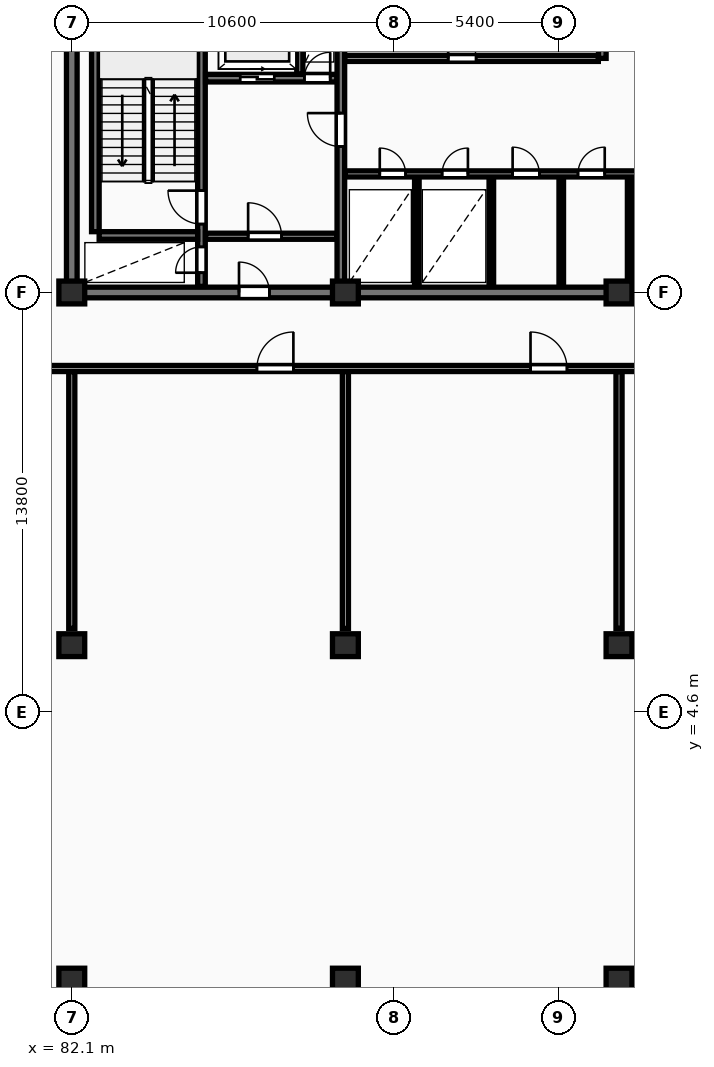
"""IFC4 building model, lengths in metres.
Left out: names, types, materials, properties, quantities, classifications, styles, units other than length and angle.
Written with IfcOpenShell. Run it as: python <this file> out.ifc"""

import sys

from ifc_helpers import new_model, si_unit, direction, frame, frame_2d, origin, origin_2d, place, context, subcontext, project, spatial, rectangle, extrude, element, fill, save


model = new_model("IFC4")
c1 = context("Model", 3, precision=1e-05, world=origin(), true_north=direction((0.0, 1.0)))
c2 = subcontext(c1, "Body", "Model", "MODEL_VIEW")
j1 = project(units=[si_unit("LENGTHUNIT", "METRE"), si_unit("PLANEANGLEUNIT", "RADIAN")], contexts=[c1])
p1 = place(None, origin())
s1 = spatial("IfcSite", under=j1, at=p1, CompositionType="ELEMENT")
p2 = place(p1, origin())
s2 = spatial("IfcBuilding", under=s1, at=p2, CompositionType="ELEMENT")
p3 = place(p2, frame((0.0, 0.0, 157.3)))
s3 = spatial("IfcBuildingStorey", under=s2, at=p3, CompositionType="ELEMENT", Elevation=157.3)
for number, where, z_axis, x_axis in (
    (1, (82.1, -4.2, 0.0), (0.0, 0.0, 1.0), (1.0, 0.0, 0.0)),
    (2, (82.1, 6.8, 0.0), (0.0, 0.0, 1.0), (1.0, 0.0, 0.0)),
    (3, (82.1, 18.4, 0.0), (0.0, 0.0, 1.0), (1.0, 0.0, 0.0)),
    (4, (91.1, -4.2, 0.0), (0.0, 0.0, 1.0), (1.0, 0.0, 0.0)),
    (5, (91.1, 6.8, 0.0), (0.0, 0.0, 1.0), (1.0, 0.0, 0.0)),
    (6, (91.1, 18.4, 0.0), (0.0, 0.0, 1.0), (1.0, 0.0, 0.0)),
    (7, (100.1, -4.2, 0.0), (0.0, 0.0, 1.0), (1.0, 0.0, 0.0)),
    (8, (100.1, 6.8, 0.0), (0.0, 0.0, 1.0), (1.0, 0.0, 0.0)),
    (9, (100.1, 18.4, 0.0), (0.0, 0.0, 1.0), (1.0, 0.0, 0.0)),
):
    element("IfcColumn", number, at=place(p3, frame(where, z_axis=z_axis, x_axis=x_axis)), inside=s3, PredefinedType="COLUMN", context=c2, shape_type="SweptSolid", body=[
        extrude(rectangle(XDim=0.85, YDim=0.75, at=origin_2d()), origin(), (0.0, 0.0, 1.0), 4.8),
    ])
p4 = place(p3, frame((82.1, 18.575, 0.0), z_axis=(0.0, 0.0, 1.0), x_axis=(0.0, 1.0, 0.0)))
e10 = element("IfcWall", 10, at=p4, inside=s3, PredefinedType="SHEAR", context=c2, shape_type="SweptSolid", body=[
    extrude(rectangle(XDim=11.65, YDim=0.35, at=frame_2d((5.825, 0.0))), origin(), (0.0, 0.0, 1.0), 4.8),
])
p5 = place(p3, frame((81.925, 18.4, 0.0), z_axis=(0.0, 0.0, 1.0), x_axis=(1.0, 0.0, 0.0)))
e11 = element("IfcWall", 11, at=p5, inside=s3, PredefinedType="SHEAR", context=c2, shape_type="SweptSolid", body=[
    extrude(rectangle(XDim=36.265, YDim=0.35, at=frame_2d((18.132, 0.0))), origin(), (0.0, 0.0, 1.0), 4.8),
])
p6 = place(p5, frame((5.675, 0.0, 0.0)))
e12 = element("IfcOpeningElement", 12, at=p6, cuts=e11, PredefinedType="OPENING", context=c2, shape_type="SweptSolid", body=[
    extrude(rectangle(XDim=1.0, YDim=2.15, at=frame_2d((0.5, 1.075))), frame((0.0, 0.185, 0.0), z_axis=(0.0, -1.0, 0.0), x_axis=(1.0, 0.0, 0.0)), (0.0, 0.0, 1.0), 0.37),
])
p7 = place(p5, frame((21.925, 0.0, 0.0)))
e13 = element("IfcOpeningElement", 13, at=p7, cuts=e11, PredefinedType="OPENING", context=c2, shape_type="SweptSolid", body=[
    extrude(rectangle(XDim=1.5, YDim=2.2, at=frame_2d((0.75, 1.1))), frame((0.0, 0.185, 0.0), z_axis=(0.0, -1.0, 0.0), x_axis=(1.0, 0.0, 0.0)), (0.0, 0.0, 1.0), 0.37),
])
p8 = place(p5, frame((29.875, 0.0, 0.0)))
e14 = element("IfcOpeningElement", 14, at=p8, cuts=e11, PredefinedType="OPENING", context=c2, shape_type="SweptSolid", body=[
    extrude(rectangle(XDim=1.0, YDim=2.15, at=frame_2d((0.5, 1.075))), frame((0.0, 0.185, 0.0), z_axis=(0.0, -1.0, 0.0), x_axis=(1.0, 0.0, 0.0)), (0.0, 0.0, 1.0), 0.37),
])
p9 = place(p3, frame((82.875, 20.4, 0.0), z_axis=(0.0, 0.0, 1.0), x_axis=(0.0, 1.0, 0.0)))
e15 = element("IfcWall", 15, at=p9, inside=s3, PredefinedType="SHEAR", context=c2, shape_type="SweptSolid", body=[
    extrude(rectangle(XDim=7.6, YDim=0.25, at=frame_2d((3.8, 0.0))), origin(), (0.0, 0.0, 1.0), 4.8),
])
p10 = place(p3, frame((86.365, 18.6, 0.0), z_axis=(0.0, 0.0, 1.0), x_axis=(0.0, 1.0, 0.0)))
e16 = element("IfcWall", 16, at=p10, inside=s3, PredefinedType="SHEAR", context=c2, shape_type="SweptSolid", body=[
    extrude(rectangle(XDim=11.6, YDim=0.25, at=frame_2d((5.8, 0.0))), origin(), (0.0, 0.0, 1.0), 4.8),
])
p11 = place(p10, frame((0.45, 0.0, 0.0)))
e17 = element("IfcOpeningElement", 17, at=p11, cuts=e16, PredefinedType="OPENING", context=c2, shape_type="SweptSolid", body=[
    extrude(rectangle(XDim=0.85, YDim=2.05, at=frame_2d((0.425, 1.025))), frame((0.0, 0.135, 0.0), z_axis=(0.0, -1.0, 0.0), x_axis=(1.0, 0.0, 0.0)), (0.0, 0.0, 1.0), 0.27),
])
p12 = place(p10, frame((2.05, 0.0, 0.0)))
e18 = element("IfcOpeningElement", 18, at=p12, cuts=e16, PredefinedType="OPENING", context=c2, shape_type="SweptSolid", body=[
    extrude(rectangle(XDim=1.1, YDim=2.1, at=frame_2d((0.55, 1.05))), frame((0.0, 0.135, 0.0), z_axis=(0.0, -1.0, 0.0), x_axis=(1.0, 0.0, 0.0)), (0.0, 0.0, 1.0), 0.27),
])
p13 = place(p10, frame((9.95, 0.0, 0.0)))
e19 = element("IfcOpeningElement", 19, at=p13, cuts=e16, PredefinedType="OPENING", context=c2, shape_type="SweptSolid", body=[
    extrude(rectangle(XDim=0.85, YDim=2.05, at=frame_2d((0.425, 1.025))), frame((0.0, 0.135, 0.0), z_axis=(0.0, -1.0, 0.0), x_axis=(1.0, 0.0, 0.0)), (0.0, 0.0, 1.0), 0.27),
])
p14 = place(p3, frame((83.0, 20.275, 0.0), z_axis=(0.0, 0.0, 1.0), x_axis=(1.0, 0.0, 0.0)))
e20 = element("IfcWall", 20, at=p14, inside=s3, PredefinedType="SHEAR", context=c2, shape_type="SweptSolid", body=[
    extrude(rectangle(XDim=3.24, YDim=0.25, at=frame_2d((1.62, 0.0))), origin(), (0.0, 0.0, 1.0), 4.8),
])
p15 = place(p3, frame((86.5, 25.45, 0.0), z_axis=(0.0, 0.0, 1.0), x_axis=(1.0, 0.0, 0.0)))
e21 = element("IfcWall", 21, at=p15, inside=s3, PredefinedType="SHEAR", context=c2, shape_type="SweptSolid", body=[
    extrude(rectangle(XDim=4.32, YDim=0.25, at=frame_2d((2.16, 0.0))), origin(), (0.0, 0.0, 1.0), 4.8),
])
p16 = place(p15, frame((1.14, 0.0, 0.0)))
e22 = element("IfcOpeningElement", 22, at=p16, cuts=e21, PredefinedType="OPENING", context=c2, shape_type="SweptSolid", body=[
    extrude(rectangle(XDim=1.12, YDim=2.12, at=frame_2d((0.56, 1.06))), frame((0.0, 0.135, 0.0), z_axis=(0.0, -1.0, 0.0), x_axis=(1.0, 0.0, 0.0)), (0.0, 0.0, 1.0), 0.27),
])
p17 = place(p15, frame((3.25, 0.0, 0.0)))
e23 = element("IfcOpeningElement", 23, at=p17, cuts=e21, PredefinedType="OPENING", context=c2, shape_type="SweptSolid", body=[
    extrude(rectangle(XDim=0.85, YDim=2.05, at=frame_2d((0.425, 1.025))), frame((0.0, 0.135, 0.0), z_axis=(0.0, -1.0, 0.0), x_axis=(1.0, 0.0, 0.0)), (0.0, 0.0, 1.0), 0.27),
])
p18 = place(p3, frame((89.6, 25.58, 0.0), z_axis=(0.0, 0.0, 1.0), x_axis=(0.0, 1.0, 0.0)))
e24 = element("IfcWall", 24, at=p18, inside=s3, PredefinedType="PARTITIONING", context=c2, shape_type="SweptSolid", body=[
    extrude(rectangle(XDim=2.42, YDim=0.2, at=frame_2d((1.21, 0.0))), origin(), (0.0, 0.0, 1.0), 4.48),
])
p19 = place(p3, frame((86.5, 20.25, 0.0), z_axis=(0.0, 0.0, 1.0), x_axis=(1.0, 0.0, 0.0)))
e25 = element("IfcWall", 25, at=p19, inside=s3, PredefinedType="PARTITIONING", context=c2, shape_type="SweptSolid", body=[
    extrude(rectangle(XDim=4.32, YDim=0.2, at=frame_2d((2.16, 0.0))), origin(), (0.0, 0.0, 1.0), 4.48),
])
p20 = place(p19, frame((1.4, 0.0, 0.0)))
e26 = element("IfcOpeningElement", 26, at=p20, cuts=e25, PredefinedType="OPENING", context=c2, shape_type="SweptSolid", body=[
    extrude(rectangle(XDim=1.1, YDim=2.1, at=frame_2d((0.55, 1.05))), frame((0.0, 0.11, 0.0), z_axis=(0.0, -1.0, 0.0), x_axis=(1.0, 0.0, 0.0)), (0.0, 0.0, 1.0), 0.22),
])
p21 = place(p3, frame((90.95, 18.6, 0.0), z_axis=(0.0, 0.0, 1.0), x_axis=(0.0, 1.0, 0.0)))
e27 = element("IfcWall", 27, at=p21, inside=s3, PredefinedType="SHEAR", context=c2, shape_type="SweptSolid", body=[
    extrude(rectangle(XDim=11.6, YDim=0.25, at=frame_2d((5.8, 0.0))), origin(), (0.0, 0.0, 1.0), 4.8),
])
p22 = place(p21, frame((4.6, 0.0, 0.0)))
e28 = element("IfcOpeningElement", 28, at=p22, cuts=e27, PredefinedType="OPENING", context=c2, shape_type="SweptSolid", body=[
    extrude(rectangle(XDim=1.1, YDim=2.1, at=frame_2d((0.55, 1.05))), frame((0.0, 0.135, 0.0), z_axis=(0.0, -1.0, 0.0), x_axis=(1.0, 0.0, 0.0)), (0.0, 0.0, 1.0), 0.27),
])
p23 = place(p3, frame((91.08, 26.1, 0.0), z_axis=(0.0, 0.0, 1.0), x_axis=(1.0, 0.0, 0.0)))
e29 = element("IfcWall", 29, at=p23, inside=s3, PredefinedType="PARTITIONING", context=c2, shape_type="SweptSolid", body=[
    extrude(rectangle(XDim=8.34, YDim=0.2, at=frame_2d((4.17, 0.0))), origin(), (0.0, 0.0, 1.0), 4.48),
])
p24 = place(p23, frame((3.4, 0.0, 0.0)))
e30 = element("IfcOpeningElement", 30, at=p24, cuts=e29, PredefinedType="OPENING", context=c2, shape_type="SweptSolid", body=[
    extrude(rectangle(XDim=0.92, YDim=2.08, at=frame_2d((0.46, 1.04))), frame((0.0, 0.11, 0.0), z_axis=(0.0, -1.0, 0.0), x_axis=(1.0, 0.0, 0.0)), (0.0, 0.0, 1.0), 0.22),
])
p25 = place(p3, frame((99.55, 26.1, 0.0), z_axis=(0.0, 0.0, 1.0), x_axis=(0.0, 1.0, 0.0)))
e31 = element("IfcWall", 31, at=p25, inside=s3, PredefinedType="SHEAR", context=c2, shape_type="SweptSolid", body=[
    extrude(rectangle(XDim=4.1, YDim=0.25, at=frame_2d((2.05, 0.0))), origin(), (0.0, 0.0, 1.0), 4.8),
])
for number, where, z_axis, x_axis in (
    (32, (93.45, 18.6, 0.0), (0.0, 0.0, 1.0), (0.0, 1.0, 0.0)),
    (33, (95.9, 18.6, 0.0), (0.0, 0.0, 1.0), (0.0, 1.0, 0.0)),
    (34, (98.2, 18.6, 0.0), (0.0, 0.0, 1.0), (0.0, 1.0, 0.0)),
):
    element("IfcWall", number, at=place(p3, frame(where, z_axis=z_axis, x_axis=x_axis)), inside=s3, PredefinedType="PARTITIONING", context=c2, shape_type="SweptSolid", body=[
        extrude(rectangle(XDim=3.6, YDim=0.15, at=frame_2d((1.8, 0.0))), origin(), (0.0, 0.0, 1.0), 4.48),
    ])
p26 = place(p3, frame((100.45, 18.6, 0.0), z_axis=(0.0, 0.0, 1.0), x_axis=(0.0, 1.0, 0.0)))
e35 = element("IfcWall", 35, at=p26, inside=s3, PredefinedType="PARTITIONING", context=c2, shape_type="SweptSolid", body=[
    extrude(rectangle(XDim=3.6, YDim=0.15, at=frame_2d((1.8, 0.0))), origin(), (0.0, 0.0, 1.0), 3.33),
])
p27 = place(p3, frame((91.08, 22.3, 0.0), z_axis=(0.0, 0.0, 1.0), x_axis=(1.0, 0.0, 0.0)))
e36 = element("IfcWall", 36, at=p27, inside=s3, PredefinedType="PARTITIONING", context=c2, shape_type="SweptSolid", body=[
    extrude(rectangle(XDim=19.14, YDim=0.2, at=frame_2d((9.57, 0.0))), origin(), (0.0, 0.0, 1.0), 4.48),
])
p28 = place(p27, frame((1.15, 0.0, 0.0)))
e37 = element("IfcOpeningElement", 37, at=p28, cuts=e36, PredefinedType="OPENING", context=c2, shape_type="SweptSolid", body=[
    extrude(rectangle(XDim=0.85, YDim=2.05, at=frame_2d((0.425, 1.025))), frame((0.0, 0.11, 0.0), z_axis=(0.0, -1.0, 0.0), x_axis=(1.0, 0.0, 0.0)), (0.0, 0.0, 1.0), 0.22),
])
p29 = place(p27, frame((3.2, 0.0, 0.0)))
e38 = element("IfcOpeningElement", 38, at=p29, cuts=e36, PredefinedType="OPENING", context=c2, shape_type="SweptSolid", body=[
    extrude(rectangle(XDim=0.85, YDim=2.05, at=frame_2d((0.425, 1.025))), frame((0.0, 0.11, 0.0), z_axis=(0.0, -1.0, 0.0), x_axis=(1.0, 0.0, 0.0)), (0.0, 0.0, 1.0), 0.22),
])
p30 = place(p27, frame((12.72, 0.0, 0.0)))
e39 = element("IfcOpeningElement", 39, at=p30, cuts=e36, PredefinedType="OPENING", context=c2, shape_type="SweptSolid", body=[
    extrude(rectangle(XDim=1.5, YDim=2.2, at=frame_2d((0.75, 1.1))), frame((0.0, 0.11, 0.0), z_axis=(0.0, -1.0, 0.0), x_axis=(1.0, 0.0, 0.0)), (0.0, 0.0, 1.0), 0.22),
])
p31 = place(p27, frame((5.52, 0.0, 0.0)))
e40 = element("IfcOpeningElement", 40, at=p31, cuts=e36, PredefinedType="OPENING", context=c2, shape_type="SweptSolid", body=[
    extrude(rectangle(XDim=0.88, YDim=2.06, at=frame_2d((0.44, 1.03))), frame((0.0, 0.11, 0.0), z_axis=(0.0, -1.0, 0.0), x_axis=(1.0, 0.0, 0.0)), (0.0, 0.0, 1.0), 0.22),
])
p32 = place(p27, frame((7.67, 0.0, 0.0)))
e41 = element("IfcOpeningElement", 41, at=p32, cuts=e36, PredefinedType="OPENING", context=c2, shape_type="SweptSolid", body=[
    extrude(rectangle(XDim=0.88, YDim=2.06, at=frame_2d((0.44, 1.03))), frame((0.0, 0.11, 0.0), z_axis=(0.0, -1.0, 0.0), x_axis=(1.0, 0.0, 0.0)), (0.0, 0.0, 1.0), 0.22),
])
p33 = place(p27, frame((10.27, 0.0, 0.0)))
e42 = element("IfcOpeningElement", 42, at=p33, cuts=e36, PredefinedType="OPENING", context=c2, shape_type="SweptSolid", body=[
    extrude(rectangle(XDim=0.85, YDim=2.05, at=frame_2d((0.425, 1.025))), frame((0.0, 0.11, 0.0), z_axis=(0.0, -1.0, 0.0), x_axis=(1.0, 0.0, 0.0)), (0.0, 0.0, 1.0), 0.22),
])
p34 = place(p27, frame((15.92, 0.0, 0.0)))
e43 = element("IfcOpeningElement", 43, at=p34, cuts=e36, PredefinedType="OPENING", context=c2, shape_type="SweptSolid", body=[
    extrude(rectangle(XDim=0.96, YDim=2.1, at=frame_2d((0.48, 1.05))), frame((0.0, 0.11, 0.0), z_axis=(0.0, -1.0, 0.0), x_axis=(1.0, 0.0, 0.0)), (0.0, 0.0, 1.0), 0.22),
])
for number, where, z_axis, x_axis in (
    (44, (82.1, 7.35, 0.0), (0.0, 0.0, 1.0), (0.0, 1.0, 0.0)),
    (45, (91.1, 7.35, 0.0), (0.0, 0.0, 1.0), (0.0, 1.0, 0.0)),
    (46, (100.1, 7.35, 0.0), (0.0, 0.0, 1.0), (0.0, 1.0, 0.0)),
):
    element("IfcWall", number, at=place(p3, frame(where, z_axis=z_axis, x_axis=x_axis)), inside=s3, PredefinedType="PARTITIONING", context=c2, shape_type="SweptSolid", body=[
        extrude(rectangle(XDim=8.45, YDim=0.2, at=frame_2d((4.225, 0.0))), origin(), (0.0, 0.0, 1.0), 3.33),
    ])
p35 = place(p3, frame((72.7, 15.9, 0.0), z_axis=(0.0, 0.0, 1.0), x_axis=(1.0, 0.0, 0.0)))
e47 = element("IfcWall", 47, at=p35, inside=s3, PredefinedType="PARTITIONING", context=c2, shape_type="SweptSolid", body=[
    extrude(rectangle(XDim=58.0, YDim=0.2, at=frame_2d((29.0, 0.0))), origin(), (0.0, 0.0, 1.0), 4.48),
])
p36 = place(p35, frame((6.262, 0.0, 0.0)))
e48 = element("IfcOpeningElement", 48, at=p36, cuts=e47, PredefinedType="OPENING", context=c2, shape_type="SweptSolid", body=[
    extrude(rectangle(XDim=1.5, YDim=2.18, at=frame_2d((0.75, 1.09))), frame((0.0, 0.11, 0.0), z_axis=(0.0, -1.0, 0.0), x_axis=(1.0, 0.0, 0.0)), (0.0, 0.0, 1.0), 0.22),
])
p37 = place(p35, frame((15.489, 0.0, 0.0)))
e49 = element("IfcOpeningElement", 49, at=p37, cuts=e47, PredefinedType="OPENING", context=c2, shape_type="SweptSolid", body=[
    extrude(rectangle(XDim=1.2, YDim=2.15, at=frame_2d((0.6, 1.075))), frame((0.0, 0.11, 0.0), z_axis=(0.0, -1.0, 0.0), x_axis=(1.0, 0.0, 0.0)), (0.0, 0.0, 1.0), 0.22),
])
p38 = place(p35, frame((24.489, 0.0, 0.0)))
e50 = element("IfcOpeningElement", 50, at=p38, cuts=e47, PredefinedType="OPENING", context=c2, shape_type="SweptSolid", body=[
    extrude(rectangle(XDim=1.2, YDim=2.15, at=frame_2d((0.6, 1.075))), frame((0.0, 0.11, 0.0), z_axis=(0.0, -1.0, 0.0), x_axis=(1.0, 0.0, 0.0)), (0.0, 0.0, 1.0), 0.22),
])
p39 = place(p35, frame((29.111, 0.0, 0.0)))
e51 = element("IfcOpeningElement", 51, at=p39, cuts=e47, PredefinedType="OPENING", context=c2, shape_type="SweptSolid", body=[
    extrude(rectangle(XDim=1.2, YDim=2.15, at=frame_2d((0.6, 1.075))), frame((0.0, 0.11, 0.0), z_axis=(0.0, -1.0, 0.0), x_axis=(1.0, 0.0, 0.0)), (0.0, 0.0, 1.0), 0.22),
])
p40 = place(p35, frame((38.111, 0.0, 0.0)))
e52 = element("IfcOpeningElement", 52, at=p40, cuts=e47, PredefinedType="OPENING", context=c2, shape_type="SweptSolid", body=[
    extrude(rectangle(XDim=1.2, YDim=2.15, at=frame_2d((0.6, 1.075))), frame((0.0, 0.11, 0.0), z_axis=(0.0, -1.0, 0.0), x_axis=(1.0, 0.0, 0.0)), (0.0, 0.0, 1.0), 0.22),
])
p41 = place(p35, frame((47.008, 0.0, 0.0)))
e53 = element("IfcOpeningElement", 53, at=p41, cuts=e47, PredefinedType="OPENING", context=c2, shape_type="SweptSolid", body=[
    extrude(rectangle(XDim=1.2, YDim=2.15, at=frame_2d((0.6, 1.075))), frame((0.0, 0.11, 0.0), z_axis=(0.0, -1.0, 0.0), x_axis=(1.0, 0.0, 0.0)), (0.0, 0.0, 1.0), 0.22),
])
p42 = place(p35, frame((52.505, 0.0, 0.0)))
e54 = element("IfcOpeningElement", 54, at=p42, cuts=e47, PredefinedType="OPENING", context=c2, shape_type="SweptSolid", body=[
    extrude(rectangle(XDim=1.2, YDim=2.15, at=frame_2d((0.6, 1.075))), frame((0.0, 0.11, 0.0), z_axis=(0.0, -1.0, 0.0), x_axis=(1.0, 0.0, 0.0)), (0.0, 0.0, 1.0), 0.22),
])
p43 = place(p6, origin())
e55 = element("IfcDoor", 55, at=p43, inside=s3, OperationType="SINGLE_SWING_LEFT", PredefinedType="DOOR", context=c2, shape_type="SweptSolid", body=[
    extrude(rectangle(XDim=1.0, YDim=2.15, at=frame_2d((0.5, 1.075))), frame((0.0, 0.025, 0.0), z_axis=(0.0, -1.0, 0.0), x_axis=(1.0, 0.0, 0.0)), (0.0, 0.0, 1.0), 0.05),
])
fill(e12, e55)
p44 = place(p11, origin())
e56 = element("IfcDoor", 56, at=p44, inside=s3, OperationType="SINGLE_SWING_LEFT", PredefinedType="DOOR", context=c2, shape_type="SweptSolid", body=[
    extrude(rectangle(XDim=0.85, YDim=2.05, at=frame_2d((0.425, 1.025))), frame((0.0, 0.025, 0.0), z_axis=(0.0, -1.0, 0.0), x_axis=(1.0, 0.0, 0.0)), (0.0, 0.0, 1.0), 0.05),
])
fill(e17, e56)
p45 = place(p12, origin())
e57 = element("IfcDoor", 57, at=p45, inside=s3, OperationType="SINGLE_SWING_RIGHT", PredefinedType="DOOR", context=c2, shape_type="SweptSolid", body=[
    extrude(rectangle(XDim=1.1, YDim=2.1, at=frame_2d((0.55, 1.05))), frame((0.0, 0.025, 0.0), z_axis=(0.0, -1.0, 0.0), x_axis=(1.0, 0.0, 0.0)), (0.0, 0.0, 1.0), 0.05),
])
fill(e18, e57)
p46 = place(p16, origin())
e58 = element("IfcDoor", 58, at=p46, inside=s3, OperationType="SLIDING_TO_RIGHT", PredefinedType="DOOR", context=c2, shape_type="SweptSolid", body=[
    extrude(rectangle(XDim=1.12, YDim=2.12, at=frame_2d((0.56, 1.06))), frame((0.0, 0.025, 0.0), z_axis=(0.0, -1.0, 0.0), x_axis=(1.0, 0.0, 0.0)), (0.0, 0.0, 1.0), 0.05),
])
fill(e22, e58)
p47 = place(p17, origin())
e59 = element("IfcDoor", 59, at=p47, inside=s3, OperationType="SINGLE_SWING_RIGHT", PredefinedType="DOOR", context=c2, shape_type="SweptSolid", body=[
    extrude(rectangle(XDim=0.85, YDim=2.05, at=frame_2d((0.425, 1.025))), frame((0.0, 0.025, 0.0), z_axis=(0.0, -1.0, 0.0), x_axis=(1.0, 0.0, 0.0)), (0.0, 0.0, 1.0), 0.05),
])
fill(e23, e59)
p48 = place(p20, origin())
e60 = element("IfcDoor", 60, at=p48, inside=s3, OperationType="SINGLE_SWING_LEFT", PredefinedType="DOOR", context=c2, shape_type="SweptSolid", body=[
    extrude(rectangle(XDim=1.1, YDim=2.1, at=frame_2d((0.55, 1.05))), frame((0.0, 0.025, 0.0), z_axis=(0.0, -1.0, 0.0), x_axis=(1.0, 0.0, 0.0)), (0.0, 0.0, 1.0), 0.05),
])
fill(e26, e60)
p49 = place(p22, origin())
e61 = element("IfcDoor", 61, at=p49, inside=s3, OperationType="SINGLE_SWING_RIGHT", PredefinedType="DOOR", context=c2, shape_type="SweptSolid", body=[
    extrude(rectangle(XDim=1.1, YDim=2.1, at=frame_2d((0.55, 1.05))), frame((0.0, 0.025, 0.0), z_axis=(0.0, -1.0, 0.0), x_axis=(1.0, 0.0, 0.0)), (0.0, 0.0, 1.0), 0.05),
])
fill(e28, e61)
p50 = place(p24, origin())
e62 = element("IfcDoor", 62, at=p50, inside=s3, OperationType="SINGLE_SWING_LEFT", PredefinedType="DOOR", context=c2, shape_type="SweptSolid", body=[
    extrude(rectangle(XDim=0.92, YDim=2.08, at=frame_2d((0.46, 1.04))), frame((0.0, 0.025, 0.0), z_axis=(0.0, -1.0, 0.0), x_axis=(1.0, 0.0, 0.0)), (0.0, 0.0, 1.0), 0.05),
])
fill(e30, e62)
p51 = place(p28, origin())
e63 = element("IfcDoor", 63, at=p51, inside=s3, OperationType="SINGLE_SWING_LEFT", PredefinedType="DOOR", context=c2, shape_type="SweptSolid", body=[
    extrude(rectangle(XDim=0.85, YDim=2.05, at=frame_2d((0.425, 1.025))), frame((0.0, 0.025, 0.0), z_axis=(0.0, -1.0, 0.0), x_axis=(1.0, 0.0, 0.0)), (0.0, 0.0, 1.0), 0.05),
])
fill(e37, e63)
p52 = place(p29, origin())
e64 = element("IfcDoor", 64, at=p52, inside=s3, OperationType="SINGLE_SWING_RIGHT", PredefinedType="DOOR", context=c2, shape_type="SweptSolid", body=[
    extrude(rectangle(XDim=0.85, YDim=2.05, at=frame_2d((0.425, 1.025))), frame((0.0, 0.025, 0.0), z_axis=(0.0, -1.0, 0.0), x_axis=(1.0, 0.0, 0.0)), (0.0, 0.0, 1.0), 0.05),
])
fill(e38, e64)
p53 = place(p31, origin())
e65 = element("IfcDoor", 65, at=p53, inside=s3, OperationType="SINGLE_SWING_LEFT", PredefinedType="DOOR", context=c2, shape_type="SweptSolid", body=[
    extrude(rectangle(XDim=0.88, YDim=2.06, at=frame_2d((0.44, 1.03))), frame((0.0, 0.025, 0.0), z_axis=(0.0, -1.0, 0.0), x_axis=(1.0, 0.0, 0.0)), (0.0, 0.0, 1.0), 0.05),
])
fill(e40, e65)
p54 = place(p32, origin())
e66 = element("IfcDoor", 66, at=p54, inside=s3, OperationType="SINGLE_SWING_RIGHT", PredefinedType="DOOR", context=c2, shape_type="SweptSolid", body=[
    extrude(rectangle(XDim=0.88, YDim=2.06, at=frame_2d((0.44, 1.03))), frame((0.0, 0.025, 0.0), z_axis=(0.0, -1.0, 0.0), x_axis=(1.0, 0.0, 0.0)), (0.0, 0.0, 1.0), 0.05),
])
fill(e41, e66)
p55 = place(p37, origin())
e67 = element("IfcDoor", 67, at=p55, inside=s3, OperationType="SINGLE_SWING_RIGHT", PredefinedType="DOOR", context=c2, shape_type="SweptSolid", body=[
    extrude(rectangle(XDim=1.2, YDim=2.15, at=frame_2d((0.6, 1.075))), frame((0.0, 0.025, 0.0), z_axis=(0.0, -1.0, 0.0), x_axis=(1.0, 0.0, 0.0)), (0.0, 0.0, 1.0), 0.05),
])
fill(e49, e67)
p56 = place(p38, origin())
e68 = element("IfcDoor", 68, at=p56, inside=s3, OperationType="SINGLE_SWING_LEFT", PredefinedType="DOOR", context=c2, shape_type="SweptSolid", body=[
    extrude(rectangle(XDim=1.2, YDim=2.15, at=frame_2d((0.6, 1.075))), frame((0.0, 0.025, 0.0), z_axis=(0.0, -1.0, 0.0), x_axis=(1.0, 0.0, 0.0)), (0.0, 0.0, 1.0), 0.05),
])
fill(e50, e68)
save(model, sys.argv[1])
